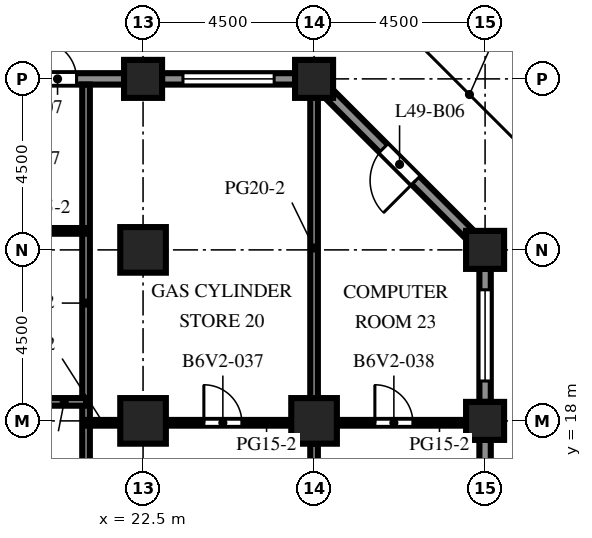
"""IFC4 building model, lengths in metres.
Left out: names, types, materials, properties, quantities, classifications, styles, units other than length and angle.
Written with IfcOpenShell. Run it as: python <this file> out.ifc"""

import sys

from ifc_helpers import new_model, si_unit, direction, frame, frame_2d, origin, origin_2d, place, context, subcontext, project, spatial, rectangle, extrude, element, fill, save


model = new_model("IFC4")
c1 = context("Model", 3, precision=1e-05, world=origin(), true_north=direction((0.0, 1.0)))
c2 = subcontext(c1, "Body", "Model", "MODEL_VIEW")
j1 = project(units=[si_unit("LENGTHUNIT", "METRE"), si_unit("PLANEANGLEUNIT", "RADIAN")], contexts=[c1])
p1 = place(None, origin())
s1 = spatial("IfcSite", under=j1, at=p1, CompositionType="ELEMENT")
p2 = place(p1, origin())
s2 = spatial("IfcBuilding", under=s1, at=p2, CompositionType="ELEMENT")
p3 = place(p2, frame((0.0, 0.0, 216.1)))
s3 = spatial("IfcBuildingStorey", under=s2, at=p3, CompositionType="ELEMENT", Elevation=216.1)
for number, where, z_axis, x_axis in (
    (1, (22.5, 27.0, 0.0), (0.0, 0.0, 1.0), (1.0, 0.0, 0.0)),
    (2, (27.0, 27.0, 0.0), (0.0, 0.0, 1.0), (1.0, 0.0, 0.0)),
    (3, (31.5, 18.0, 0.0), (0.0, 0.0, 1.0), (1.0, 0.0, 0.0)),
    (4, (31.5, 22.5, 0.0), (0.0, 0.0, 1.0), (1.0, 0.0, 0.0)),
):
    element("IfcColumn", number, at=place(p3, frame(where, z_axis=z_axis, x_axis=x_axis)), inside=s3, PredefinedType="COLUMN", context=c2, shape_type="SweptSolid", body=[
        extrude(rectangle(XDim=1.0, YDim=1.0, at=origin_2d()), origin(), (0.0, 0.0, 1.0), 4.1),
    ])
for number, where, z_axis, x_axis in (
    (5, (22.5, 18.0, 0.0), (0.0, 0.0, 1.0), (1.0, 0.0, 0.0)),
    (6, (22.5, 22.5, 0.0), (0.0, 0.0, 1.0), (1.0, 0.0, 0.0)),
    (7, (27.0, 18.0, 0.0), (0.0, 0.0, 1.0), (1.0, 0.0, 0.0)),
):
    element("IfcColumn", number, at=place(p3, frame(where, z_axis=z_axis, x_axis=x_axis)), inside=s3, PredefinedType="COLUMN", context=c2, shape_type="SweptSolid", body=[
        extrude(rectangle(XDim=1.2, YDim=1.2, at=origin_2d()), origin(), (0.0, 0.0, 1.0), 4.1),
    ])
p4 = place(p3, frame((31.5, 17.5, 0.0), z_axis=(0.0, 0.0, 1.0), x_axis=(0.0, -1.0, 0.0)))
e8 = element("IfcWall", 8, at=p4, inside=s3, PredefinedType="SOLIDWALL", context=c2, shape_type="SweptSolid", body=[
    extrude(rectangle(XDim=3.5, YDim=0.3, at=frame_2d((1.75, 0.0))), origin(), (0.0, 0.0, 1.0), 2.7),
])
p5 = place(p4, frame((1.25, 0.0, 0.0)))
e9 = element("IfcOpeningElement", 9, at=p5, cuts=e8, PredefinedType="OPENING", context=c2, shape_type="SweptSolid", body=[
    extrude(rectangle(XDim=1.0, YDim=2.2, at=frame_2d((0.5, 1.1))), frame((0.0, 0.16, 0.0), z_axis=(0.0, -1.0, 0.0), x_axis=(1.0, 0.0, 0.0)), (0.0, 0.0, 1.0), 0.32),
])
p6 = place(p3, frame((31.5, 22.0, 0.0), z_axis=(0.0, 0.0, 1.0), x_axis=(0.0, -1.0, 0.0)))
e10 = element("IfcWall", 10, at=p6, inside=s3, PredefinedType="SOLIDWALL", context=c2, shape_type="SweptSolid", body=[
    extrude(rectangle(XDim=3.5, YDim=0.3, at=frame_2d((1.75, 0.0))), origin(), (0.0, 0.0, 1.0), 2.7),
])
p7 = place(p6, frame((0.55, 0.0, 0.8)))
e11 = element("IfcOpeningElement", 11, at=p7, cuts=e10, PredefinedType="OPENING", context=c2, shape_type="SweptSolid", body=[
    extrude(rectangle(XDim=2.4, YDim=1.7, at=frame_2d((1.2, 0.85))), frame((0.0, 0.16, 0.0), z_axis=(0.0, -1.0, 0.0), x_axis=(1.0, 0.0, 0.0)), (0.0, 0.0, 1.0), 0.32),
])
p8 = place(p3, frame((27.394, 26.606, 0.0), z_axis=(0.0, 0.0, 1.0), x_axis=(0.707106781187, -0.707106781187, 0.0)))
e12 = element("IfcWall", 12, at=p8, inside=s3, PredefinedType="SOLIDWALL", context=c2, shape_type="SweptSolid", body=[
    extrude(rectangle(XDim=5.25, YDim=0.3, at=frame_2d((2.625, 0.0))), origin(), (0.0, 0.0, 1.0), 2.7),
])
p9 = place(p8, frame((2.025, 0.0, 0.0)))
e13 = element("IfcOpeningElement", 13, at=p9, cuts=e12, PredefinedType="OPENING", context=c2, shape_type="SweptSolid", body=[
    extrude(rectangle(XDim=1.2, YDim=2.2, at=frame_2d((0.6, 1.1))), frame((0.0, 0.16, 0.0), z_axis=(0.0, -1.0, 0.0), x_axis=(1.0, 0.0, 0.0)), (0.0, 0.0, 1.0), 0.32),
])
p10 = place(p3, frame((23.0, 27.0, 0.0), z_axis=(0.0, 0.0, 1.0), x_axis=(1.0, 0.0, 0.0)))
e14 = element("IfcWall", 14, at=p10, inside=s3, PredefinedType="SOLIDWALL", context=c2, shape_type="SweptSolid", body=[
    extrude(rectangle(XDim=3.5, YDim=0.3, at=frame_2d((1.75, 0.0))), origin(), (0.0, 0.0, 1.0), 2.7),
])
p11 = place(p10, frame((0.55, 0.0, 0.8)))
e15 = element("IfcOpeningElement", 15, at=p11, cuts=e14, PredefinedType="OPENING", context=c2, shape_type="SweptSolid", body=[
    extrude(rectangle(XDim=2.4, YDim=1.7, at=frame_2d((1.2, 0.85))), frame((0.0, 0.16, 0.0), z_axis=(0.0, -1.0, 0.0), x_axis=(1.0, 0.0, 0.0)), (0.0, 0.0, 1.0), 0.32),
])
p12 = place(p3, frame((18.5, 27.0, 0.0), z_axis=(0.0, 0.0, 1.0), x_axis=(1.0, 0.0, 0.0)))
e16 = element("IfcWall", 16, at=p12, inside=s3, PredefinedType="SOLIDWALL", context=c2, shape_type="SweptSolid", body=[
    extrude(rectangle(XDim=3.5, YDim=0.3, at=frame_2d((1.75, 0.0))), origin(), (0.0, 0.0, 1.0), 2.7),
])
p13 = place(p12, frame((1.25, 0.0, 0.0)))
e17 = element("IfcOpeningElement", 17, at=p13, cuts=e16, PredefinedType="OPENING", context=c2, shape_type="SweptSolid", body=[
    extrude(rectangle(XDim=1.0, YDim=2.2, at=frame_2d((0.5, 1.1))), frame((0.0, 0.16, 0.0), z_axis=(0.0, -1.0, 0.0), x_axis=(1.0, 0.0, 0.0)), (0.0, 0.0, 1.0), 0.32),
])
p14 = place(p3, frame((21.0, 26.85, 0.0), z_axis=(0.0, 0.0, 1.0), x_axis=(0.0, -1.0, 0.0)))
e18 = element("IfcWall", 18, at=p14, inside=s3, PredefinedType="PARTITIONING", context=c2, shape_type="SweptSolid", body=[
    extrude(rectangle(XDim=20.6, YDim=0.2, at=frame_2d((10.3, 0.0))), origin(), (0.0, 0.0, 1.0), 3.5),
])
p15 = place(p14, frame((11.5, 0.0, 0.0)))
e19 = element("IfcOpeningElement", 19, at=p15, cuts=e18, PredefinedType="OPENING", context=c2, shape_type="SweptSolid", body=[
    extrude(rectangle(XDim=1.0, YDim=2.1, at=frame_2d((0.5, 1.05))), frame((0.0, 0.11, 0.0), z_axis=(0.0, -1.0, 0.0), x_axis=(1.0, 0.0, 0.0)), (0.0, 0.0, 1.0), 0.22),
])
p16 = place(p3, frame((27.0, 9.6, 0.0), z_axis=(0.0, 0.0, 1.0), x_axis=(0.0, 1.0, 0.0)))
e20 = element("IfcWall", 20, at=p16, inside=s3, PredefinedType="PARTITIONING", context=c2, shape_type="SweptSolid", body=[
    extrude(rectangle(XDim=7.8, YDim=0.2, at=frame_2d((3.9, 0.0))), origin(), (0.0, 0.0, 1.0), 3.5),
])
p17 = place(p3, frame((27.0, 18.6, 0.0), z_axis=(0.0, 0.0, 1.0), x_axis=(0.0, 1.0, 0.0)))
e21 = element("IfcWall", 21, at=p17, inside=s3, PredefinedType="PARTITIONING", context=c2, shape_type="SweptSolid", body=[
    extrude(rectangle(XDim=7.9, YDim=0.2, at=frame_2d((3.95, 0.0))), origin(), (0.0, 0.0, 1.0), 3.5),
])
p18 = place(p3, frame((21.0, 17.95, 0.0), z_axis=(0.0, 0.0, 1.0), x_axis=(1.0, 0.0, 0.0)))
e22 = element("IfcWall", 22, at=p18, inside=s3, PredefinedType="PARTITIONING", context=c2, shape_type="SweptSolid", body=[
    extrude(rectangle(XDim=0.9, YDim=0.15, at=frame_2d((0.45, 0.0))), origin(), (0.0, 0.0, 1.0), 3.5),
])
p19 = place(p3, frame((23.1, 17.95, 0.0), z_axis=(0.0, 0.0, 1.0), x_axis=(1.0, 0.0, 0.0)))
e23 = element("IfcWall", 23, at=p19, inside=s3, PredefinedType="PARTITIONING", context=c2, shape_type="SweptSolid", body=[
    extrude(rectangle(XDim=3.3, YDim=0.15, at=frame_2d((1.65, 0.0))), origin(), (0.0, 0.0, 1.0), 3.5),
])
p20 = place(p19, frame((1.0, 0.0, 0.0)))
e24 = element("IfcOpeningElement", 24, at=p20, cuts=e23, PredefinedType="OPENING", context=c2, shape_type="SweptSolid", body=[
    extrude(rectangle(XDim=1.0, YDim=2.1, at=frame_2d((0.5, 1.05))), frame((0.0, 0.085, 0.0), z_axis=(0.0, -1.0, 0.0), x_axis=(1.0, 0.0, 0.0)), (0.0, 0.0, 1.0), 0.17),
])
p21 = place(p3, frame((27.6, 17.95, 0.0), z_axis=(0.0, 0.0, 1.0), x_axis=(1.0, 0.0, 0.0)))
e25 = element("IfcWall", 25, at=p21, inside=s3, PredefinedType="PARTITIONING", context=c2, shape_type="SweptSolid", body=[
    extrude(rectangle(XDim=3.4, YDim=0.15, at=frame_2d((1.7, 0.0))), origin(), (0.0, 0.0, 1.0), 3.5),
])
p22 = place(p21, frame((1.0, 0.0, 0.0)))
e26 = element("IfcOpeningElement", 26, at=p22, cuts=e25, PredefinedType="OPENING", context=c2, shape_type="SweptSolid", body=[
    extrude(rectangle(XDim=1.0, YDim=2.1, at=frame_2d((0.5, 1.05))), frame((0.0, 0.085, 0.0), z_axis=(0.0, -1.0, 0.0), x_axis=(1.0, 0.0, 0.0)), (0.0, 0.0, 1.0), 0.17),
])
p23 = place(p3, frame((18.0, 18.5, 0.0), z_axis=(0.0, 0.0, 1.0), x_axis=(1.0, 0.0, 0.0)))
e27 = element("IfcWall", 27, at=p23, inside=s3, PredefinedType="PARTITIONING", context=c2, shape_type="SweptSolid", body=[
    extrude(rectangle(XDim=3.0, YDim=0.2, at=frame_2d((1.5, 0.0))), origin(), (0.0, 0.0, 1.0), 3.5),
])
p24 = place(p23, frame((0.85, 0.0, 0.0)))
e28 = element("IfcOpeningElement", 28, at=p24, cuts=e27, PredefinedType="OPENING", context=c2, shape_type="SweptSolid", body=[
    extrude(rectangle(XDim=1.0, YDim=2.1, at=frame_2d((0.5, 1.05))), frame((0.0, 0.11, 0.0), z_axis=(0.0, -1.0, 0.0), x_axis=(1.0, 0.0, 0.0)), (0.0, 0.0, 1.0), 0.22),
])
p25 = place(p3, frame((18.6, 23.0, 0.0), z_axis=(0.0, 0.0, 1.0), x_axis=(1.0, 0.0, 0.0)))
e29 = element("IfcWall", 29, at=p25, inside=s3, PredefinedType="PARTITIONING", context=c2, shape_type="SweptSolid", body=[
    extrude(rectangle(XDim=2.4, YDim=0.15, at=frame_2d((1.2, 0.0))), origin(), (0.0, 0.0, 1.0), 3.5),
])
p26 = place(p7, origin())
e30 = element("IfcWindow", 30, at=p26, inside=s3, PartitioningType="SINGLE_PANEL", PredefinedType="WINDOW", context=c2, shape_type="SweptSolid", body=[
    extrude(rectangle(XDim=2.4, YDim=1.7, at=frame_2d((1.2, 0.85))), frame((0.0, 0.03, 0.0), z_axis=(0.0, -1.0, 0.0), x_axis=(1.0, 0.0, 0.0)), (0.0, 0.0, 1.0), 0.06),
])
fill(e11, e30)
p27 = place(p9, origin())
e31 = element("IfcDoor", 31, at=p27, inside=s3, OperationType="SINGLE_SWING_RIGHT", PredefinedType="DOOR", context=c2, shape_type="SweptSolid", body=[
    extrude(rectangle(XDim=1.2, YDim=2.2, at=frame_2d((0.6, 1.1))), frame((0.0, 0.025, 0.0), z_axis=(0.0, -1.0, 0.0), x_axis=(1.0, 0.0, 0.0)), (0.0, 0.0, 1.0), 0.05),
])
fill(e13, e31)
p28 = place(p11, origin())
e32 = element("IfcWindow", 32, at=p28, inside=s3, PartitioningType="SINGLE_PANEL", PredefinedType="WINDOW", context=c2, shape_type="SweptSolid", body=[
    extrude(rectangle(XDim=2.4, YDim=1.7, at=frame_2d((1.2, 0.85))), frame((0.0, 0.03, 0.0), z_axis=(0.0, -1.0, 0.0), x_axis=(1.0, 0.0, 0.0)), (0.0, 0.0, 1.0), 0.06),
])
fill(e15, e32)
p29 = place(p13, origin())
e33 = element("IfcDoor", 33, at=p29, inside=s3, OperationType="SINGLE_SWING_LEFT", PredefinedType="DOOR", context=c2, shape_type="SweptSolid", body=[
    extrude(rectangle(XDim=1.0, YDim=2.2, at=frame_2d((0.5, 1.1))), frame((0.0, 0.025, 0.0), z_axis=(0.0, -1.0, 0.0), x_axis=(1.0, 0.0, 0.0)), (0.0, 0.0, 1.0), 0.05),
])
fill(e17, e33)
p30 = place(p20, origin())
e34 = element("IfcDoor", 34, at=p30, inside=s3, OperationType="SINGLE_SWING_LEFT", PredefinedType="DOOR", context=c2, shape_type="SweptSolid", body=[
    extrude(rectangle(XDim=1.0, YDim=2.1, at=frame_2d((0.5, 1.05))), frame((0.0, 0.025, 0.0), z_axis=(0.0, -1.0, 0.0), x_axis=(1.0, 0.0, 0.0)), (0.0, 0.0, 1.0), 0.05),
])
fill(e24, e34)
p31 = place(p22, origin())
e35 = element("IfcDoor", 35, at=p31, inside=s3, OperationType="SINGLE_SWING_LEFT", PredefinedType="DOOR", context=c2, shape_type="SweptSolid", body=[
    extrude(rectangle(XDim=1.0, YDim=2.1, at=frame_2d((0.5, 1.05))), frame((0.0, 0.025, 0.0), z_axis=(0.0, -1.0, 0.0), x_axis=(1.0, 0.0, 0.0)), (0.0, 0.0, 1.0), 0.05),
])
fill(e26, e35)
save(model, sys.argv[1])
